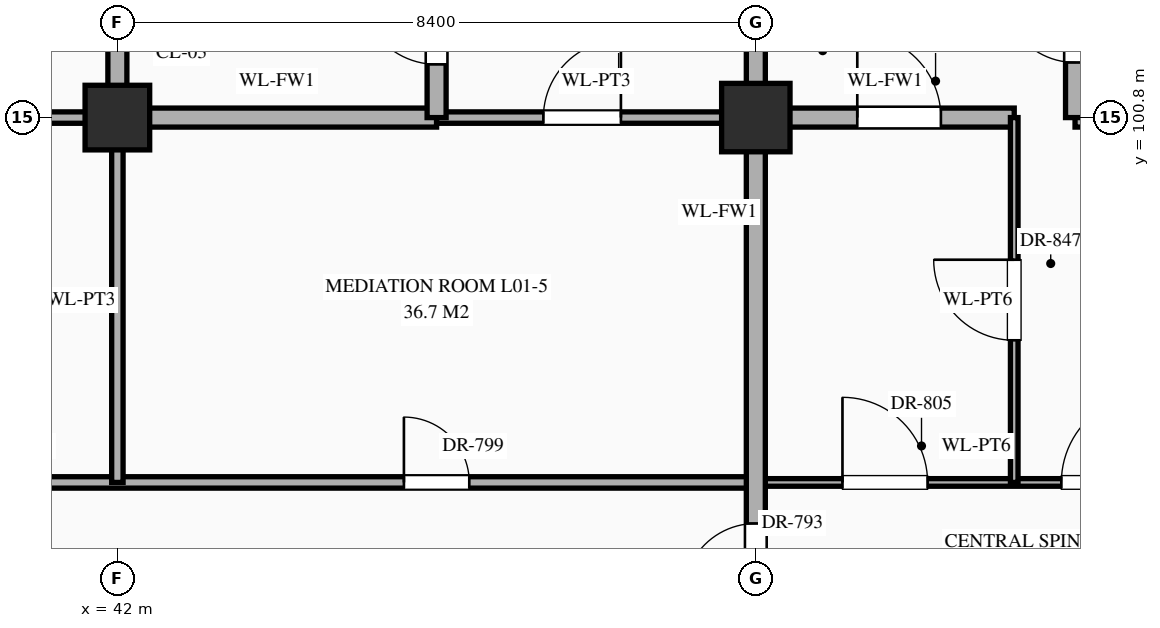
"""IFC4 building model, lengths in metres.
Left out: names, types, materials, properties, quantities, classifications, styles, units other than length and angle.
Written with IfcOpenShell. Run it as: python <this file> out.ifc"""

import sys

from ifc_helpers import new_model, si_unit, direction, frame, frame_2d, origin, origin_2d, place, context, subcontext, project, spatial, rectangle, extrude, element, fill, save


model = new_model("IFC4")
c1 = context("Model", 3, precision=1e-05, world=origin(), true_north=direction((0.0, 1.0)))
c2 = subcontext(c1, "Body", "Model", "MODEL_VIEW")
j1 = project(units=[si_unit("LENGTHUNIT", "METRE"), si_unit("PLANEANGLEUNIT", "RADIAN")], contexts=[c1])
p1 = place(None, origin())
s1 = spatial("IfcSite", under=j1, at=p1, CompositionType="ELEMENT")
p2 = place(p1, origin())
s2 = spatial("IfcBuilding", under=s1, at=p2, CompositionType="ELEMENT")
p3 = place(p2, origin())
s3 = spatial("IfcBuildingStorey", under=s2, at=p3, CompositionType="ELEMENT", Elevation=0.0)
p4 = place(p3, frame((42.0, 100.8, 0.0), z_axis=(0.0, 0.0, 1.0), x_axis=(1.0, 0.0, 0.0)))
e1 = element("IfcColumn", 1, at=p4, inside=s3, PredefinedType="COLUMN", context=c2, shape_type="SweptSolid", body=[
    extrude(rectangle(XDim=0.85, YDim=0.85, at=origin_2d()), origin(), (0.0, 0.0, 1.0), 5.4),
])
p5 = place(p3, frame((50.4, 100.8, 0.0), z_axis=(0.0, 0.0, 1.0), x_axis=(1.0, 0.0, 0.0)))
e2 = element("IfcColumn", 2, at=p5, inside=s3, PredefinedType="COLUMN", context=c2, shape_type="SweptSolid", body=[
    extrude(rectangle(XDim=0.9, YDim=0.9, at=origin_2d()), origin(), (0.0, 0.0, 1.0), 5.4),
])
p6 = place(p3, frame((31.0, 96.0, 0.0), z_axis=(0.0, 0.0, 1.0), x_axis=(1.0, 0.0, 0.0)))
e3 = element("IfcWall", 3, at=p6, inside=s3, PredefinedType="STANDARD", context=c2, shape_type="SweptSolid", body=[
    extrude(rectangle(XDim=19.4, YDim=0.15, at=frame_2d((9.7, 0.0))), origin(), (0.0, 0.0, 1.0), 5.12),
])
p7 = place(p6, frame((0.73, 0.0, 0.0)))
e4 = element("IfcOpeningElement", 4, at=p7, cuts=e3, PredefinedType="OPENING", context=c2, shape_type="SweptSolid", body=[
    extrude(rectangle(XDim=1.14, YDim=2.4, at=frame_2d((0.57, 1.2))), frame((0.0, 0.087, 0.0), z_axis=(0.0, -1.0, 0.0), x_axis=(1.0, 0.0, 0.0)), (0.0, 0.0, 1.0), 0.174),
])
p8 = place(p6, frame((6.35, 0.0, 0.0)))
e5 = element("IfcOpeningElement", 5, at=p8, cuts=e3, PredefinedType="OPENING", context=c2, shape_type="SweptSolid", body=[
    extrude(rectangle(XDim=0.9, YDim=2.15, at=frame_2d((0.45, 1.075))), frame((0.0, 0.087, 0.0), z_axis=(0.0, -1.0, 0.0), x_axis=(1.0, 0.0, 0.0)), (0.0, 0.0, 1.0), 0.174),
])
p9 = place(p6, frame((14.77, 0.0, 0.0)))
e6 = element("IfcOpeningElement", 6, at=p9, cuts=e3, PredefinedType="OPENING", context=c2, shape_type="SweptSolid", body=[
    extrude(rectangle(XDim=0.86, YDim=2.1, at=frame_2d((0.43, 1.05))), frame((0.0, 0.087, 0.0), z_axis=(0.0, -1.0, 0.0), x_axis=(1.0, 0.0, 0.0)), (0.0, 0.0, 1.0), 0.174),
])
p10 = place(p3, frame((50.4, 96.0, 0.0), z_axis=(0.0, 0.0, 1.0), x_axis=(1.0, 0.0, 0.0)))
e7 = element("IfcWall", 7, at=p10, inside=s3, PredefinedType="STANDARD", context=c2, shape_type="SweptSolid", body=[
    extrude(rectangle(XDim=5.8, YDim=0.1, at=frame_2d((2.9, 0.0))), origin(), (0.0, 0.0, 1.0), 5.12),
])
p11 = place(p10, frame((1.14, 0.0, 0.0)))
e8 = element("IfcOpeningElement", 8, at=p11, cuts=e7, PredefinedType="OPENING", context=c2, shape_type="SweptSolid", body=[
    extrude(rectangle(XDim=1.12, YDim=2.25, at=frame_2d((0.56, 1.125))), frame((0.0, 0.062, 0.0), z_axis=(0.0, -1.0, 0.0), x_axis=(1.0, 0.0, 0.0)), (0.0, 0.0, 1.0), 0.124),
])
p12 = place(p10, frame((4.02, 0.0, 0.0)))
e9 = element("IfcOpeningElement", 9, at=p12, cuts=e7, PredefinedType="OPENING", context=c2, shape_type="SweptSolid", body=[
    extrude(rectangle(XDim=1.16, YDim=2.3, at=frame_2d((0.58, 1.15))), frame((0.0, 0.062, 0.0), z_axis=(0.0, -1.0, 0.0), x_axis=(1.0, 0.0, 0.0)), (0.0, 0.0, 1.0), 0.124),
])
p13 = place(p3, frame((31.0, 100.8, 0.0), z_axis=(0.0, 0.0, 1.0), x_axis=(1.0, 0.0, 0.0)))
e10 = element("IfcWall", 10, at=p13, inside=s3, PredefinedType="STANDARD", context=c2, shape_type="SweptSolid", body=[
    extrude(rectangle(XDim=11.0, YDim=0.15, at=frame_2d((5.5, 0.0))), origin(), (0.0, 0.0, 1.0), 4.27),
])
p14 = place(p13, frame((0.667, 0.0, 0.0)))
e11 = element("IfcOpeningElement", 11, at=p14, cuts=e10, PredefinedType="OPENING", context=c2, shape_type="SweptSolid", body=[
    extrude(rectangle(XDim=0.92, YDim=2.15, at=frame_2d((0.46, 1.075))), frame((0.0, 0.087, 0.0), z_axis=(0.0, -1.0, 0.0), x_axis=(1.0, 0.0, 0.0)), (0.0, 0.0, 1.0), 0.174),
])
p15 = place(p13, frame((6.32, 0.0, 0.0)))
e12 = element("IfcOpeningElement", 12, at=p15, cuts=e10, PredefinedType="OPENING", context=c2, shape_type="SweptSolid", body=[
    extrude(rectangle(XDim=0.96, YDim=2.2, at=frame_2d((0.48, 1.1))), frame((0.0, 0.087, 0.0), z_axis=(0.0, -1.0, 0.0), x_axis=(1.0, 0.0, 0.0)), (0.0, 0.0, 1.0), 0.174),
])
p16 = place(p3, frame((42.0, 100.8, 0.0), z_axis=(0.0, 0.0, 1.0), x_axis=(1.0, 0.0, 0.0)))
e13 = element("IfcWall", 13, at=p16, inside=s3, PredefinedType="STANDARD", context=c2, shape_type="SweptSolid", body=[
    extrude(rectangle(XDim=4.2, YDim=0.25, at=frame_2d((2.1, 0.0))), origin(), (0.0, 0.0, 1.0), 4.27),
])
p17 = place(p3, frame((46.2, 100.8, 0.0), z_axis=(0.0, 0.0, 1.0), x_axis=(1.0, 0.0, 0.0)))
e14 = element("IfcWall", 14, at=p17, inside=s3, PredefinedType="STANDARD", context=c2, shape_type="SweptSolid", body=[
    extrude(rectangle(XDim=4.2, YDim=0.15, at=frame_2d((2.1, 0.0))), origin(), (0.0, 0.0, 1.0), 4.27),
])
p18 = place(p17, frame((1.405, 0.0, 0.0)))
e15 = element("IfcOpeningElement", 15, at=p18, cuts=e14, PredefinedType="OPENING", context=c2, shape_type="SweptSolid", body=[
    extrude(rectangle(XDim=1.02, YDim=2.4, at=frame_2d((0.51, 1.2))), frame((0.0, 0.087, 0.0), z_axis=(0.0, -1.0, 0.0), x_axis=(1.0, 0.0, 0.0)), (0.0, 0.0, 1.0), 0.174),
])
p19 = place(p3, frame((50.4, 100.8, 0.0), z_axis=(0.0, 0.0, 1.0), x_axis=(1.0, 0.0, 0.0)))
e16 = element("IfcWall", 16, at=p19, inside=s3, PredefinedType="STANDARD", context=c2, shape_type="SweptSolid", body=[
    extrude(rectangle(XDim=3.4, YDim=0.25, at=frame_2d((1.7, 0.0))), origin(), (0.0, 0.0, 1.0), 4.27),
])
p20 = place(p19, frame((1.335, 0.0, 0.0)))
e17 = element("IfcOpeningElement", 17, at=p20, cuts=e16, PredefinedType="OPENING", context=c2, shape_type="SweptSolid", body=[
    extrude(rectangle(XDim=1.1, YDim=2.2, at=frame_2d((0.55, 1.1))), frame((0.0, 0.137, 0.0), z_axis=(0.0, -1.0, 0.0), x_axis=(1.0, 0.0, 0.0)), (0.0, 0.0, 1.0), 0.274),
])
p21 = place(p3, frame((54.6, 100.8, 0.0), z_axis=(0.0, 0.0, 1.0), x_axis=(1.0, 0.0, 0.0)))
e18 = element("IfcWall", 18, at=p21, inside=s3, PredefinedType="STANDARD", context=c2, shape_type="SweptSolid", body=[
    extrude(rectangle(XDim=16.8, YDim=0.25, at=frame_2d((8.4, 0.0))), origin(), (0.0, 0.0, 1.0), 4.27),
])
p22 = place(p21, frame((7.925, 0.0, 0.0)))
e19 = element("IfcOpeningElement", 19, at=p22, cuts=e18, PredefinedType="OPENING", context=c2, shape_type="SweptSolid", body=[
    extrude(rectangle(XDim=0.95, YDim=2.15, at=frame_2d((0.475, 1.075))), frame((0.0, 0.137, 0.0), z_axis=(0.0, -1.0, 0.0), x_axis=(1.0, 0.0, 0.0)), (0.0, 0.0, 1.0), 0.274),
])
p23 = place(p21, frame((13.985, 0.0, 0.0)))
e20 = element("IfcOpeningElement", 20, at=p23, cuts=e18, PredefinedType="OPENING", context=c2, shape_type="SweptSolid", body=[
    extrude(rectangle(XDim=1.8, YDim=2.35, at=frame_2d((0.9, 1.175))), frame((0.0, 0.137, 0.0), z_axis=(0.0, -1.0, 0.0), x_axis=(1.0, 0.0, 0.0)), (0.0, 0.0, 1.0), 0.274),
])
p24 = place(p21, frame((0.25, 0.0, 0.0)))
e21 = element("IfcOpeningElement", 21, at=p24, cuts=e18, PredefinedType="OPENING", context=c2, shape_type="SweptSolid", body=[
    extrude(rectangle(XDim=1.1, YDim=2.2, at=frame_2d((0.55, 1.1))), frame((0.0, 0.137, 0.0), z_axis=(0.0, -1.0, 0.0), x_axis=(1.0, 0.0, 0.0)), (0.0, 0.0, 1.0), 0.274),
])
p25 = place(p3, frame((42.0, 96.0, 0.0), z_axis=(0.0, 0.0, 1.0), x_axis=(0.0, 1.0, 0.0)))
e22 = element("IfcWall", 22, at=p25, inside=s3, PredefinedType="STANDARD", context=c2, shape_type="SweptSolid", body=[
    extrude(rectangle(XDim=4.8, YDim=0.15, at=frame_2d((2.4, 0.0))), origin(), (0.0, 0.0, 1.0), 4.37),
])
p26 = place(p3, frame((42.0, 100.8, 0.0), z_axis=(0.0, 0.0, 1.0), x_axis=(0.0, 1.0, 0.0)))
e23 = element("IfcWall", 23, at=p26, inside=s3, PredefinedType="STANDARD", context=c2, shape_type="SweptSolid", body=[
    extrude(rectangle(XDim=3.6, YDim=0.25, at=frame_2d((1.8, 0.0))), origin(), (0.0, 0.0, 1.0), 4.37),
])
p27 = place(p26, frame((0.897, 0.0, 0.0)))
e24 = element("IfcOpeningElement", 24, at=p27, cuts=e23, PredefinedType="OPENING", context=c2, shape_type="SweptSolid", body=[
    extrude(rectangle(XDim=0.95, YDim=2.15, at=frame_2d((0.475, 1.075))), frame((0.0, 0.137, 0.0), z_axis=(0.0, -1.0, 0.0), x_axis=(1.0, 0.0, 0.0)), (0.0, 0.0, 1.0), 0.274),
])
p28 = place(p3, frame((46.2, 100.8, 0.0), z_axis=(0.0, 0.0, 1.0), x_axis=(0.0, 1.0, 0.0)))
e25 = element("IfcWall", 25, at=p28, inside=s3, PredefinedType="STANDARD", context=c2, shape_type="SweptSolid", body=[
    extrude(rectangle(XDim=3.6, YDim=0.25, at=frame_2d((1.8, 0.0))), origin(), (0.0, 0.0, 1.0), 4.72),
])
p29 = place(p28, frame((0.7, 0.0, 0.0)))
e26 = element("IfcOpeningElement", 26, at=p29, cuts=e25, PredefinedType="OPENING", context=c2, shape_type="SweptSolid", body=[
    extrude(rectangle(XDim=1.0, YDim=2.2, at=frame_2d((0.5, 1.1))), frame((0.0, 0.137, 0.0), z_axis=(0.0, -1.0, 0.0), x_axis=(1.0, 0.0, 0.0)), (0.0, 0.0, 1.0), 0.274),
])
p30 = place(p3, frame((50.4, 91.2, 0.0), z_axis=(0.0, 0.0, 1.0), x_axis=(0.0, 1.0, 0.0)))
e27 = element("IfcWall", 27, at=p30, inside=s3, PredefinedType="STANDARD", context=c2, shape_type="SweptSolid", body=[
    extrude(rectangle(XDim=13.2, YDim=0.25, at=frame_2d((6.6, 0.0))), origin(), (0.0, 0.0, 1.0), 4.37),
])
p31 = place(p30, frame((0.54, 0.0, 0.0)))
e28 = element("IfcOpeningElement", 28, at=p31, cuts=e27, PredefinedType="OPENING", context=c2, shape_type="SweptSolid", body=[
    extrude(rectangle(XDim=0.95, YDim=2.15, at=frame_2d((0.475, 1.075))), frame((0.0, 0.137, 0.0), z_axis=(0.0, -1.0, 0.0), x_axis=(1.0, 0.0, 0.0)), (0.0, 0.0, 1.0), 0.274),
])
p32 = place(p30, frame((10.485, 0.0, 0.0)))
e29 = element("IfcOpeningElement", 29, at=p32, cuts=e27, PredefinedType="OPENING", context=c2, shape_type="SweptSolid", body=[
    extrude(rectangle(XDim=1.0, YDim=2.2, at=frame_2d((0.5, 1.1))), frame((0.0, 0.137, 0.0), z_axis=(0.0, -1.0, 0.0), x_axis=(1.0, 0.0, 0.0)), (0.0, 0.0, 1.0), 0.274),
])
p33 = place(p30, frame((3.31, 0.0, 0.0)))
e30 = element("IfcOpeningElement", 30, at=p33, cuts=e27, PredefinedType="OPENING", context=c2, shape_type="SweptSolid", body=[
    extrude(rectangle(XDim=0.95, YDim=2.15, at=frame_2d((0.475, 1.075))), frame((0.0, 0.137, 0.0), z_axis=(0.0, -1.0, 0.0), x_axis=(1.0, 0.0, 0.0)), (0.0, 0.0, 1.0), 0.274),
])
p34 = place(p3, frame((53.8, 96.0, 0.0), z_axis=(0.0, 0.0, 1.0), x_axis=(0.0, 1.0, 0.0)))
e31 = element("IfcWall", 31, at=p34, inside=s3, PredefinedType="STANDARD", context=c2, shape_type="SweptSolid", body=[
    extrude(rectangle(XDim=4.8, YDim=0.1, at=frame_2d((2.4, 0.0))), origin(), (0.0, 0.0, 1.0), 5.12),
])
p35 = place(p34, frame((1.87, 0.0, 0.0)))
e32 = element("IfcOpeningElement", 32, at=p35, cuts=e31, PredefinedType="OPENING", context=c2, shape_type="SweptSolid", body=[
    extrude(rectangle(XDim=1.06, YDim=2.4, at=frame_2d((0.53, 1.2))), frame((0.0, 0.062, 0.0), z_axis=(0.0, -1.0, 0.0), x_axis=(1.0, 0.0, 0.0)), (0.0, 0.0, 1.0), 0.124),
])
p36 = place(p3, frame((54.6, 100.8, 0.0), z_axis=(0.0, 0.0, 1.0), x_axis=(0.0, 1.0, 0.0)))
e33 = element("IfcWall", 33, at=p36, inside=s3, PredefinedType="STANDARD", context=c2, shape_type="SweptSolid", body=[
    extrude(rectangle(XDim=3.6, YDim=0.25, at=frame_2d((1.8, 0.0))), origin(), (0.0, 0.0, 1.0), 4.57),
])
p37 = place(p36, frame((0.725, 0.0, 0.0)))
e34 = element("IfcOpeningElement", 34, at=p37, cuts=e33, PredefinedType="OPENING", context=c2, shape_type="SweptSolid", body=[
    extrude(rectangle(XDim=0.95, YDim=2.15, at=frame_2d((0.475, 1.075))), frame((0.0, 0.137, 0.0), z_axis=(0.0, -1.0, 0.0), x_axis=(1.0, 0.0, 0.0)), (0.0, 0.0, 1.0), 0.274),
])
p38 = place(p29, origin())
e35 = element("IfcDoor", 35, at=p38, inside=s3, OperationType="SINGLE_SWING_RIGHT", PredefinedType="DOOR", context=c2, shape_type="SweptSolid", body=[
    extrude(rectangle(XDim=1.0, YDim=2.2, at=frame_2d((0.5, 1.1))), frame((0.0, 0.025, 0.0), z_axis=(0.0, -1.0, 0.0), x_axis=(1.0, 0.0, 0.0)), (0.0, 0.0, 1.0), 0.05),
])
fill(e26, e35)
p39 = place(p18, origin())
e36 = element("IfcDoor", 36, at=p39, inside=s3, OperationType="SINGLE_SWING_RIGHT", PredefinedType="DOOR", context=c2, shape_type="SweptSolid", body=[
    extrude(rectangle(XDim=1.02, YDim=2.4, at=frame_2d((0.51, 1.2))), frame((0.0, 0.025, 0.0), z_axis=(0.0, -1.0, 0.0), x_axis=(1.0, 0.0, 0.0)), (0.0, 0.0, 1.0), 0.05),
])
fill(e15, e36)
p40 = place(p37, origin())
e37 = element("IfcDoor", 37, at=p40, inside=s3, OperationType="SINGLE_SWING_RIGHT", PredefinedType="DOOR", context=c2, shape_type="SweptSolid", body=[
    extrude(rectangle(XDim=0.95, YDim=2.15, at=frame_2d((0.475, 1.075))), frame((0.0, 0.025, 0.0), z_axis=(0.0, -1.0, 0.0), x_axis=(1.0, 0.0, 0.0)), (0.0, 0.0, 1.0), 0.05),
])
fill(e34, e37)
p41 = place(p20, origin())
e38 = element("IfcDoor", 38, at=p41, inside=s3, OperationType="SINGLE_SWING_LEFT", PredefinedType="DOOR", context=c2, shape_type="SweptSolid", body=[
    extrude(rectangle(XDim=1.1, YDim=2.2, at=frame_2d((0.55, 1.1))), frame((0.0, 0.025, 0.0), z_axis=(0.0, -1.0, 0.0), x_axis=(1.0, 0.0, 0.0)), (0.0, 0.0, 1.0), 0.05),
])
fill(e17, e38)
p42 = place(p33, origin())
e39 = element("IfcDoor", 39, at=p42, inside=s3, OperationType="SINGLE_SWING_LEFT", PredefinedType="DOOR", context=c2, shape_type="SweptSolid", body=[
    extrude(rectangle(XDim=0.95, YDim=2.15, at=frame_2d((0.475, 1.075))), frame((0.0, 0.025, 0.0), z_axis=(0.0, -1.0, 0.0), x_axis=(1.0, 0.0, 0.0)), (0.0, 0.0, 1.0), 0.05),
])
fill(e30, e39)
p43 = place(p9, origin())
e40 = element("IfcDoor", 40, at=p43, inside=s3, OperationType="SINGLE_SWING_LEFT", PredefinedType="DOOR", context=c2, shape_type="SweptSolid", body=[
    extrude(rectangle(XDim=0.86, YDim=2.1, at=frame_2d((0.43, 1.05))), frame((0.0, 0.025, 0.0), z_axis=(0.0, -1.0, 0.0), x_axis=(1.0, 0.0, 0.0)), (0.0, 0.0, 1.0), 0.05),
])
fill(e6, e40)
p44 = place(p11, origin())
e41 = element("IfcDoor", 41, at=p44, inside=s3, OperationType="SINGLE_SWING_LEFT", PredefinedType="DOOR", context=c2, shape_type="SweptSolid", body=[
    extrude(rectangle(XDim=1.12, YDim=2.25, at=frame_2d((0.56, 1.125))), frame((0.0, 0.025, 0.0), z_axis=(0.0, -1.0, 0.0), x_axis=(1.0, 0.0, 0.0)), (0.0, 0.0, 1.0), 0.05),
])
fill(e8, e41)
p45 = place(p12, origin())
e42 = element("IfcDoor", 42, at=p45, inside=s3, OperationType="SINGLE_SWING_RIGHT", PredefinedType="DOOR", context=c2, shape_type="SweptSolid", body=[
    extrude(rectangle(XDim=1.16, YDim=2.3, at=frame_2d((0.58, 1.15))), frame((0.0, 0.025, 0.0), z_axis=(0.0, -1.0, 0.0), x_axis=(1.0, 0.0, 0.0)), (0.0, 0.0, 1.0), 0.05),
])
fill(e9, e42)
p46 = place(p35, origin())
e43 = element("IfcDoor", 43, at=p46, inside=s3, OperationType="SINGLE_SWING_RIGHT", PredefinedType="DOOR", context=c2, shape_type="SweptSolid", body=[
    extrude(rectangle(XDim=1.06, YDim=2.4, at=frame_2d((0.53, 1.2))), frame((0.0, 0.025, 0.0), z_axis=(0.0, -1.0, 0.0), x_axis=(1.0, 0.0, 0.0)), (0.0, 0.0, 1.0), 0.05),
])
fill(e32, e43)
save(model, sys.argv[1])
